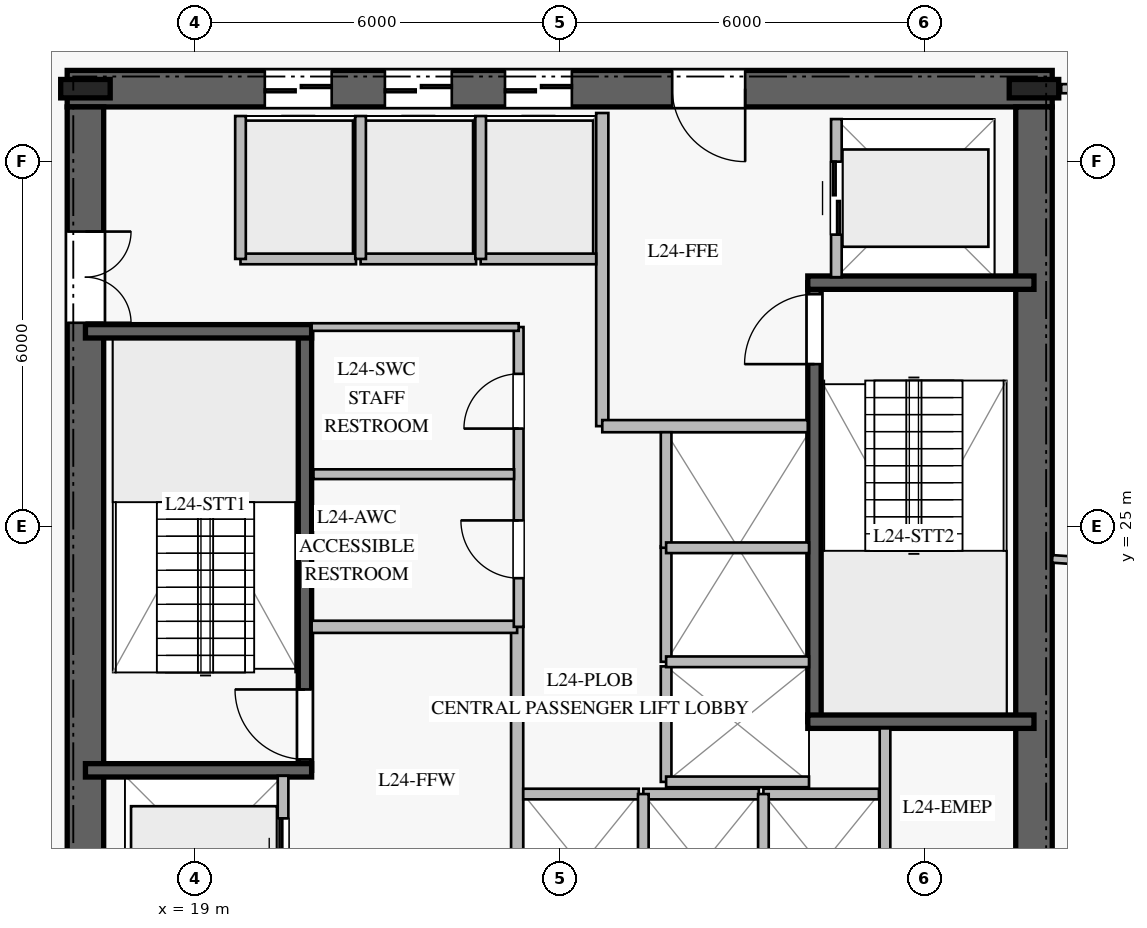
"""IFC4 building model, lengths in metres.
Left out: names, types, materials, properties, quantities, classifications, styles, units other than length and angle.
Written with IfcOpenShell. Run it as: python <this file> out.ifc"""

import sys

from ifc_helpers import new_model, si_unit, direction, frame, frame_2d, origin, origin_2d, place, context, subcontext, project, spatial, rectangle, i_section, extrude, element, fill, save


model = new_model("IFC4")
c1 = context("Model", 3, precision=1e-05, world=origin(), true_north=direction((0.0, 1.0)))
c2 = subcontext(c1, "Body", "Model", "MODEL_VIEW")
j1 = project(units=[si_unit("LENGTHUNIT", "METRE"), si_unit("PLANEANGLEUNIT", "RADIAN")], contexts=[c1])
p1 = place(None, origin())
s1 = spatial("IfcSite", under=j1, at=p1, CompositionType="ELEMENT")
p2 = place(p1, origin())
s2 = spatial("IfcBuilding", under=s1, at=p2, CompositionType="ELEMENT")
p3 = place(p2, frame((0.0, 0.0, 102.4)))
s3 = spatial("IfcBuildingStorey", under=s2, at=p3, CompositionType="ELEMENT", Elevation=102.4)
p4 = place(p3, frame((33.1, 32.2, 0.0), z_axis=(0.0, 0.0, 1.0), x_axis=(-1.0, 0.0, 0.0)))
e1 = element("IfcWall", 1, at=p4, inside=s3, PredefinedType="SHEAR", context=c2, shape_type="SweptSolid", body=[
    extrude(rectangle(XDim=16.2, YDim=0.6, at=frame_2d((8.1, 0.0))), origin(), (0.0, 0.0, 1.0), 3.76),
])
p5 = place(p4, frame((5.05, 0.0, 0.0)))
e2 = element("IfcOpeningElement", 2, at=p5, cuts=e1, PredefinedType="OPENING", context=c2, shape_type="SweptSolid", body=[
    extrude(rectangle(XDim=1.2, YDim=2.25, at=frame_2d((0.6, 1.125))), frame((0.0, 0.31, 0.0), z_axis=(0.0, -1.0, 0.0), x_axis=(1.0, 0.0, 0.0)), (0.0, 0.0, 1.0), 0.62),
])
p6 = place(p4, frame((11.85, 0.0, 0.0)))
e3 = element("IfcOpeningElement", 3, at=p6, cuts=e1, PredefinedType="OPENING", context=c2, shape_type="SweptSolid", body=[
    extrude(rectangle(XDim=1.1, YDim=2.2, at=frame_2d((0.55, 1.1))), frame((0.0, 0.31, 0.0), z_axis=(0.0, -1.0, 0.0), x_axis=(1.0, 0.0, 0.0)), (0.0, 0.0, 1.0), 0.62),
])
p7 = place(p4, frame((9.875, 0.0, 0.0)))
e4 = element("IfcOpeningElement", 4, at=p7, cuts=e1, PredefinedType="OPENING", context=c2, shape_type="SweptSolid", body=[
    extrude(rectangle(XDim=1.1, YDim=2.2, at=frame_2d((0.55, 1.1))), frame((0.0, 0.31, 0.0), z_axis=(0.0, -1.0, 0.0), x_axis=(1.0, 0.0, 0.0)), (0.0, 0.0, 1.0), 0.62),
])
p8 = place(p4, frame((7.9, 0.0, 0.0)))
e5 = element("IfcOpeningElement", 5, at=p8, cuts=e1, PredefinedType="OPENING", context=c2, shape_type="SweptSolid", body=[
    extrude(rectangle(XDim=1.1, YDim=2.2, at=frame_2d((0.55, 1.1))), frame((0.0, 0.31, 0.0), z_axis=(0.0, -1.0, 0.0), x_axis=(1.0, 0.0, 0.0)), (0.0, 0.0, 1.0), 0.62),
])
p9 = place(p3, frame((17.2, 31.9, 0.0), z_axis=(0.0, 0.0, 1.0), x_axis=(0.0, -1.0, 0.0)))
e6 = element("IfcWall", 6, at=p9, inside=s3, PredefinedType="SHEAR", context=c2, shape_type="SweptSolid", body=[
    extrude(rectangle(XDim=13.8, YDim=0.6, at=frame_2d((6.9, 0.0))), origin(), (0.0, 0.0, 1.0), 3.76),
])
p10 = place(p9, frame((2.05, 0.0, 0.0)))
e7 = element("IfcOpeningElement", 7, at=p10, cuts=e6, PredefinedType="OPENING", context=c2, shape_type="SweptSolid", body=[
    extrude(rectangle(XDim=1.5, YDim=2.2, at=frame_2d((0.75, 1.1))), frame((0.0, 0.31, 0.0), z_axis=(0.0, -1.0, 0.0), x_axis=(1.0, 0.0, 0.0)), (0.0, 0.0, 1.0), 0.62),
])
p11 = place(p3, frame((32.8, 18.1, 0.0), z_axis=(0.0, 0.0, 1.0), x_axis=(0.0, 1.0, 0.0)))
e8 = element("IfcWall", 8, at=p11, inside=s3, PredefinedType="SHEAR", context=c2, shape_type="SweptSolid", body=[
    extrude(rectangle(XDim=13.8, YDim=0.6, at=frame_2d((6.9, 0.0))), origin(), (0.0, 0.0, 1.0), 3.76),
])
for number, where, z_axis, x_axis in (
    (9, (32.8, 32.2, 0.0), (0.0, 0.0, 1.0), (1.0, 0.0, 0.0)),
    (10, (17.2, 32.2, 0.0), (0.0, 0.0, 1.0), (1.0, 0.0, 0.0)),
):
    element("IfcColumn", number, at=place(p3, frame(where, z_axis=z_axis, x_axis=x_axis)), inside=s3, PredefinedType="COLUMN", context=c2, shape_type="SweptSolid", body=[
        extrude(i_section(OverallWidth=0.303, OverallDepth=0.814, WebThickness=0.021, FlangeThickness=0.04, at=origin_2d()), origin(), (0.0, 0.0, 1.0), 4.0),
    ])
p12 = place(p3, frame((20.81, 20.99, 0.0), z_axis=(0.0, 0.0, 1.0), x_axis=(0.0, 1.0, 0.0)))
e11 = element("IfcWall", 11, at=p12, inside=s3, PredefinedType="SOLIDWALL", context=c2, shape_type="SweptSolid", body=[
    extrude(rectangle(XDim=7.22, YDim=0.22, at=frame_2d((3.61, 0.0))), origin(), (0.0, 0.0, 1.0), 3.76),
])
p13 = place(p12, frame((0.18, 0.0, 0.0)))
e12 = element("IfcOpeningElement", 12, at=p13, cuts=e11, PredefinedType="OPENING", context=c2, shape_type="SweptSolid", body=[
    extrude(rectangle(XDim=1.15, YDim=2.2, at=frame_2d((0.575, 1.1))), frame((0.0, 0.12, 0.0), z_axis=(0.0, -1.0, 0.0), x_axis=(1.0, 0.0, 0.0)), (0.0, 0.0, 1.0), 0.24),
])
for number, where, z_axis, x_axis in (
    (13, (17.2, 20.99, 0.0), (0.0, 0.0, 1.0), (1.0, 0.0, 0.0)),
    (14, (17.2, 28.21, 0.0), (0.0, 0.0, 1.0), (1.0, 0.0, 0.0)),
):
    element("IfcWall", number, at=place(p3, frame(where, z_axis=z_axis, x_axis=x_axis)), inside=s3, PredefinedType="SOLIDWALL", context=c2, shape_type="SweptSolid", body=[
        extrude(rectangle(XDim=3.72, YDim=0.22, at=frame_2d((1.86, 0.0))), origin(), (0.0, 0.0, 1.0), 3.76),
    ])
p14 = place(p3, frame((29.19, 21.79, 0.0), z_axis=(0.0, 0.0, 1.0), x_axis=(0.0, 1.0, 0.0)))
e15 = element("IfcWall", 15, at=p14, inside=s3, PredefinedType="SOLIDWALL", context=c2, shape_type="SweptSolid", body=[
    extrude(rectangle(XDim=7.22, YDim=0.22, at=frame_2d((3.61, 0.0))), origin(), (0.0, 0.0, 1.0), 3.76),
])
p15 = place(p14, frame((5.88, 0.0, 0.0)))
e16 = element("IfcOpeningElement", 16, at=p15, cuts=e15, PredefinedType="OPENING", context=c2, shape_type="SweptSolid", body=[
    extrude(rectangle(XDim=1.15, YDim=2.2, at=frame_2d((0.575, 1.1))), frame((0.0, 0.12, 0.0), z_axis=(0.0, -1.0, 0.0), x_axis=(1.0, 0.0, 0.0)), (0.0, 0.0, 1.0), 0.24),
])
for number, where, z_axis, x_axis in (
    (17, (29.08, 21.79, 0.0), (0.0, 0.0, 1.0), (1.0, 0.0, 0.0)),
    (18, (29.08, 29.01, 0.0), (0.0, 0.0, 1.0), (1.0, 0.0, 0.0)),
):
    element("IfcWall", number, at=place(p3, frame(where, z_axis=z_axis, x_axis=x_axis)), inside=s3, PredefinedType="SOLIDWALL", context=c2, shape_type="SweptSolid", body=[
        extrude(rectangle(XDim=3.72, YDim=0.22, at=frame_2d((1.86, 0.0))), origin(), (0.0, 0.0, 1.0), 3.76),
    ])
p16 = place(p3, frame((24.3, 18.2, 0.0), z_axis=(0.0, 0.0, 1.0), x_axis=(0.0, 1.0, 0.0)))
e19 = element("IfcWall", 19, at=p16, inside=s3, PredefinedType="PARTITIONING", context=c2, shape_type="SweptSolid", body=[
    extrude(rectangle(XDim=5.15, YDim=0.2, at=frame_2d((2.575, 0.0))), origin(), (0.0, 0.0, 1.0), 3.76),
])
p17 = place(p3, frame((20.92, 23.35, 0.0), z_axis=(0.0, 0.0, 1.0), x_axis=(1.0, 0.0, 0.0)))
e20 = element("IfcWall", 20, at=p17, inside=s3, PredefinedType="PARTITIONING", context=c2, shape_type="SweptSolid", body=[
    extrude(rectangle(XDim=3.38, YDim=0.2, at=frame_2d((1.69, 0.0))), origin(), (0.0, 0.0, 1.0), 3.76),
])
p18 = place(p3, frame((25.7, 26.65, 0.0), z_axis=(0.0, 0.0, 1.0), x_axis=(0.0, 1.0, 0.0)))
e21 = element("IfcWall", 21, at=p18, inside=s3, PredefinedType="PARTITIONING", context=c2, shape_type="SweptSolid", body=[
    extrude(rectangle(XDim=5.15, YDim=0.2, at=frame_2d((2.575, 0.0))), origin(), (0.0, 0.0, 1.0), 3.76),
])
p19 = place(p3, frame((25.7, 26.65, 0.0), z_axis=(0.0, 0.0, 1.0), x_axis=(1.0, 0.0, 0.0)))
e22 = element("IfcWall", 22, at=p19, inside=s3, PredefinedType="PARTITIONING", context=c2, shape_type="SweptSolid", body=[
    extrude(rectangle(XDim=3.38, YDim=0.2, at=frame_2d((1.69, 0.0))), origin(), (0.0, 0.0, 1.0), 3.76),
])
p20 = place(p3, frame((24.325, 23.35, 0.0), z_axis=(0.0, 0.0, 1.0), x_axis=(0.0, 1.0, 0.0)))
e23 = element("IfcWall", 23, at=p20, inside=s3, PredefinedType="PLUMBINGWALL", context=c2, shape_type="SweptSolid", body=[
    extrude(rectangle(XDim=4.93, YDim=0.16, at=frame_2d((2.465, 0.0))), origin(), (0.0, 0.0, 1.0), 3.76),
])
p21 = place(p20, frame((0.8, 0.0, 0.0)))
e24 = element("IfcOpeningElement", 24, at=p21, cuts=e23, PredefinedType="OPENING", context=c2, shape_type="SweptSolid", body=[
    extrude(rectangle(XDim=0.95, YDim=2.1, at=frame_2d((0.475, 1.05))), frame((0.0, 0.09, 0.0), z_axis=(0.0, -1.0, 0.0), x_axis=(1.0, 0.0, 0.0)), (0.0, 0.0, 1.0), 0.18),
])
p22 = place(p20, frame((3.26, 0.0, 0.0)))
e25 = element("IfcOpeningElement", 25, at=p22, cuts=e23, PredefinedType="OPENING", context=c2, shape_type="SweptSolid", body=[
    extrude(rectangle(XDim=0.9, YDim=2.1, at=frame_2d((0.45, 1.05))), frame((0.0, 0.09, 0.0), z_axis=(0.0, -1.0, 0.0), x_axis=(1.0, 0.0, 0.0)), (0.0, 0.0, 1.0), 0.18),
])
p23 = place(p3, frame((20.92, 28.28, 0.0), z_axis=(0.0, 0.0, 1.0), x_axis=(1.0, 0.0, 0.0)))
e26 = element("IfcWall", 26, at=p23, inside=s3, PredefinedType="PARTITIONING", context=c2, shape_type="SweptSolid", body=[
    extrude(rectangle(XDim=3.405, YDim=0.125, at=frame_2d((1.703, 0.0))), origin(), (0.0, 0.0, 1.0), 3.76),
])
p24 = place(p3, frame((20.95, 25.86, 0.0), z_axis=(0.0, 0.0, 1.0), x_axis=(1.0, 0.0, 0.0)))
e27 = element("IfcWall", 27, at=p24, inside=s3, PredefinedType="PLUMBINGWALL", context=c2, shape_type="SweptSolid", body=[
    extrude(rectangle(XDim=3.3, YDim=0.16, at=frame_2d((1.65, 0.0))), origin(), (0.0, 0.0, 1.0), 3.76),
])
p25 = place(p3, frame((30.35, 18.2, 0.0), z_axis=(0.0, 0.0, 1.0), x_axis=(0.0, 1.0, 0.0)))
e28 = element("IfcWall", 28, at=p25, inside=s3, PredefinedType="PARTITIONING", context=c2, shape_type="SweptSolid", body=[
    extrude(rectangle(XDim=3.48, YDim=0.175, at=frame_2d((1.74, 0.0))), origin(), (0.0, 0.0, 1.0), 3.76),
])
p26 = place(p3, frame((24.4, 20.6, 0.0), z_axis=(0.0, 0.0, 1.0), x_axis=(1.0, 0.0, 0.0)))
e29 = element("IfcWall", 29, at=p26, inside=s3, PredefinedType="PARTITIONING", context=c2, shape_type="SweptSolid", body=[
    extrude(rectangle(XDim=1.9, YDim=0.175, at=frame_2d((0.95, 0.0))), origin(), (0.0, 0.0, 1.0), 3.76),
])
p27 = place(p3, frame((26.375, 20.6, 0.0), z_axis=(0.0, 0.0, 1.0), x_axis=(1.0, 0.0, 0.0)))
e30 = element("IfcWall", 30, at=p27, inside=s3, PredefinedType="PARTITIONING", context=c2, shape_type="SweptSolid", body=[
    extrude(rectangle(XDim=1.9, YDim=0.175, at=frame_2d((0.95, 0.0))), origin(), (0.0, 0.0, 1.0), 3.76),
])
p28 = place(p3, frame((26.375, 18.25, 0.0), z_axis=(0.0, 0.0, 1.0), x_axis=(0.0, 1.0, 0.0)))
e31 = element("IfcWall", 31, at=p28, inside=s3, PredefinedType="PARTITIONING", context=c2, shape_type="SweptSolid", body=[
    extrude(rectangle(XDim=2.35, YDim=0.175, at=frame_2d((1.175, 0.0))), origin(), (0.0, 0.0, 1.0), 3.76),
])
p29 = place(p3, frame((28.35, 20.6, 0.0), z_axis=(0.0, 0.0, 1.0), x_axis=(1.0, 0.0, 0.0)))
e32 = element("IfcWall", 32, at=p29, inside=s3, PredefinedType="PARTITIONING", context=c2, shape_type="SweptSolid", body=[
    extrude(rectangle(XDim=1.9, YDim=0.175, at=frame_2d((0.95, 0.0))), origin(), (0.0, 0.0, 1.0), 3.76),
])
p30 = place(p3, frame((28.35, 18.25, 0.0), z_axis=(0.0, 0.0, 1.0), x_axis=(0.0, 1.0, 0.0)))
e33 = element("IfcWall", 33, at=p30, inside=s3, PredefinedType="PARTITIONING", context=c2, shape_type="SweptSolid", body=[
    extrude(rectangle(XDim=2.35, YDim=0.175, at=frame_2d((1.175, 0.0))), origin(), (0.0, 0.0, 1.0), 3.76),
])
p31 = place(p3, frame((19.75, 29.4, 0.0), z_axis=(0.0, 0.0, 1.0), x_axis=(1.0, 0.0, 0.0)))
e34 = element("IfcWall", 34, at=p31, inside=s3, PredefinedType="PARTITIONING", context=c2, shape_type="SweptSolid", body=[
    extrude(rectangle(XDim=1.9, YDim=0.175, at=frame_2d((0.95, 0.0))), origin(), (0.0, 0.0, 1.0), 3.76),
])
p32 = place(p3, frame((19.75, 29.4, 0.0), z_axis=(0.0, 0.0, 1.0), x_axis=(0.0, 1.0, 0.0)))
e35 = element("IfcWall", 35, at=p32, inside=s3, PredefinedType="PARTITIONING", context=c2, shape_type="SweptSolid", body=[
    extrude(rectangle(XDim=2.35, YDim=0.175, at=frame_2d((1.175, 0.0))), origin(), (0.0, 0.0, 1.0), 3.76),
])
p33 = place(p3, frame((21.725, 29.4, 0.0), z_axis=(0.0, 0.0, 1.0), x_axis=(1.0, 0.0, 0.0)))
e36 = element("IfcWall", 36, at=p33, inside=s3, PredefinedType="PARTITIONING", context=c2, shape_type="SweptSolid", body=[
    extrude(rectangle(XDim=1.9, YDim=0.175, at=frame_2d((0.95, 0.0))), origin(), (0.0, 0.0, 1.0), 3.76),
])
p34 = place(p3, frame((21.725, 29.4, 0.0), z_axis=(0.0, 0.0, 1.0), x_axis=(0.0, 1.0, 0.0)))
e37 = element("IfcWall", 37, at=p34, inside=s3, PredefinedType="PARTITIONING", context=c2, shape_type="SweptSolid", body=[
    extrude(rectangle(XDim=2.35, YDim=0.175, at=frame_2d((1.175, 0.0))), origin(), (0.0, 0.0, 1.0), 3.76),
])
p35 = place(p3, frame((23.7, 29.4, 0.0), z_axis=(0.0, 0.0, 1.0), x_axis=(1.0, 0.0, 0.0)))
e38 = element("IfcWall", 38, at=p35, inside=s3, PredefinedType="PARTITIONING", context=c2, shape_type="SweptSolid", body=[
    extrude(rectangle(XDim=1.9, YDim=0.175, at=frame_2d((0.95, 0.0))), origin(), (0.0, 0.0, 1.0), 3.76),
])
p36 = place(p3, frame((23.7, 29.4, 0.0), z_axis=(0.0, 0.0, 1.0), x_axis=(0.0, 1.0, 0.0)))
e39 = element("IfcWall", 39, at=p36, inside=s3, PredefinedType="PARTITIONING", context=c2, shape_type="SweptSolid", body=[
    extrude(rectangle(XDim=2.35, YDim=0.175, at=frame_2d((1.175, 0.0))), origin(), (0.0, 0.0, 1.0), 3.76),
])
p37 = place(p3, frame((26.75, 20.8, 0.0), z_axis=(0.0, 0.0, 1.0), x_axis=(0.0, 1.0, 0.0)))
e40 = element("IfcWall", 40, at=p37, inside=s3, PredefinedType="PARTITIONING", context=c2, shape_type="SweptSolid", body=[
    extrude(rectangle(XDim=1.9, YDim=0.175, at=frame_2d((0.95, 0.0))), origin(), (0.0, 0.0, 1.0), 3.76),
])
p38 = place(p3, frame((26.75, 20.8, 0.0), z_axis=(0.0, 0.0, 1.0), x_axis=(1.0, 0.0, 0.0)))
e41 = element("IfcWall", 41, at=p38, inside=s3, PredefinedType="PARTITIONING", context=c2, shape_type="SweptSolid", body=[
    extrude(rectangle(XDim=2.35, YDim=0.175, at=frame_2d((1.175, 0.0))), origin(), (0.0, 0.0, 1.0), 3.76),
])
p39 = place(p3, frame((26.75, 22.775, 0.0), z_axis=(0.0, 0.0, 1.0), x_axis=(0.0, 1.0, 0.0)))
e42 = element("IfcWall", 42, at=p39, inside=s3, PredefinedType="PARTITIONING", context=c2, shape_type="SweptSolid", body=[
    extrude(rectangle(XDim=1.9, YDim=0.175, at=frame_2d((0.95, 0.0))), origin(), (0.0, 0.0, 1.0), 3.76),
])
p40 = place(p3, frame((26.75, 22.775, 0.0), z_axis=(0.0, 0.0, 1.0), x_axis=(1.0, 0.0, 0.0)))
e43 = element("IfcWall", 43, at=p40, inside=s3, PredefinedType="PARTITIONING", context=c2, shape_type="SweptSolid", body=[
    extrude(rectangle(XDim=2.35, YDim=0.175, at=frame_2d((1.175, 0.0))), origin(), (0.0, 0.0, 1.0), 3.76),
])
p41 = place(p3, frame((26.75, 24.65, 0.0), z_axis=(0.0, 0.0, 1.0), x_axis=(0.0, 1.0, 0.0)))
e44 = element("IfcWall", 44, at=p41, inside=s3, PredefinedType="PARTITIONING", context=c2, shape_type="SweptSolid", body=[
    extrude(rectangle(XDim=1.9, YDim=0.175, at=frame_2d((0.95, 0.0))), origin(), (0.0, 0.0, 1.0), 3.76),
])
p42 = place(p3, frame((26.75, 24.65, 0.0), z_axis=(0.0, 0.0, 1.0), x_axis=(1.0, 0.0, 0.0)))
e45 = element("IfcWall", 45, at=p42, inside=s3, PredefinedType="PARTITIONING", context=c2, shape_type="SweptSolid", body=[
    extrude(rectangle(XDim=2.35, YDim=0.175, at=frame_2d((1.175, 0.0))), origin(), (0.0, 0.0, 1.0), 3.76),
])
p43 = place(p3, frame((20.45, 18.3, 0.0), z_axis=(0.0, 0.0, 1.0), x_axis=(0.0, 1.0, 0.0)))
e46 = element("IfcWall", 46, at=p43, inside=s3, PredefinedType="PARTITIONING", context=c2, shape_type="SweptSolid", body=[
    extrude(rectangle(XDim=2.6, YDim=0.175, at=frame_2d((1.3, 0.0))), origin(), (0.0, 0.0, 1.0), 3.76),
])
p44 = place(p43, frame((0.7, 0.0, 0.0)))
e47 = element("IfcOpeningElement", 47, at=p44, cuts=e46, PredefinedType="OPENING", context=c2, shape_type="SweptSolid", body=[
    extrude(rectangle(XDim=1.2, YDim=2.2, at=frame_2d((0.6, 1.1))), frame((0.0, 0.098, 0.0), z_axis=(0.0, -1.0, 0.0), x_axis=(1.0, 0.0, 0.0)), (0.0, 0.0, 1.0), 0.195),
])
p45 = place(p3, frame((29.55, 29.1, 0.0), z_axis=(0.0, 0.0, 1.0), x_axis=(0.0, 1.0, 0.0)))
e48 = element("IfcWall", 48, at=p45, inside=s3, PredefinedType="PARTITIONING", context=c2, shape_type="SweptSolid", body=[
    extrude(rectangle(XDim=2.6, YDim=0.175, at=frame_2d((1.3, 0.0))), origin(), (0.0, 0.0, 1.0), 3.76),
])
p46 = place(p45, frame((0.7, 0.0, 0.0)))
e49 = element("IfcOpeningElement", 49, at=p46, cuts=e48, PredefinedType="OPENING", context=c2, shape_type="SweptSolid", body=[
    extrude(rectangle(XDim=1.2, YDim=2.2, at=frame_2d((0.6, 1.1))), frame((0.0, 0.098, 0.0), z_axis=(0.0, -1.0, 0.0), x_axis=(1.0, 0.0, 0.0)), (0.0, 0.0, 1.0), 0.195),
])
p47 = place(p3, frame((41.2, 32.2, 0.0), z_axis=(0.0, 0.0, 1.0), x_axis=(-1.0, 0.0, 0.0)))
e50 = element("IfcWall", 50, at=p47, inside=s3, PredefinedType="PARTITIONING", context=c2, shape_type="SweptSolid", body=[
    extrude(rectangle(XDim=7.953, YDim=0.15, at=frame_2d((3.977, 0.0))), origin(), (0.0, 0.0, 1.0), 3.21),
])
p48 = place(p3, frame((33.1, 24.467, 0.0), z_axis=(0.0, 0.0, 1.0), x_axis=(0.997841404392, -0.06566986889, 0.0)))
e51 = element("IfcWall", 51, at=p48, inside=s3, PredefinedType="PARTITIONING", context=c2, shape_type="SweptSolid", body=[
    extrude(rectangle(XDim=11.755, YDim=0.125, at=frame_2d((5.878, 0.0))), origin(), (0.0, 0.0, 1.0), 3.05),
])
p49 = place(p13, origin())
e52 = element("IfcDoor", 52, at=p49, inside=s3, OperationType="SINGLE_SWING_RIGHT", PredefinedType="DOOR", context=c2, shape_type="SweptSolid", body=[
    extrude(rectangle(XDim=1.15, YDim=2.2, at=frame_2d((0.575, 1.1))), frame((0.0, 0.025, 0.0), z_axis=(0.0, -1.0, 0.0), x_axis=(1.0, 0.0, 0.0)), (0.0, 0.0, 1.0), 0.05),
])
fill(e12, e52)
p50 = place(p15, origin())
e53 = element("IfcDoor", 53, at=p50, inside=s3, OperationType="SINGLE_SWING_LEFT", PredefinedType="DOOR", context=c2, shape_type="SweptSolid", body=[
    extrude(rectangle(XDim=1.15, YDim=2.2, at=frame_2d((0.575, 1.1))), frame((0.0, 0.025, 0.0), z_axis=(0.0, -1.0, 0.0), x_axis=(1.0, 0.0, 0.0)), (0.0, 0.0, 1.0), 0.05),
])
fill(e16, e53)
p51 = place(p5, origin())
e54 = element("IfcDoor", 54, at=p51, inside=s3, OperationType="SINGLE_SWING_LEFT", PredefinedType="DOOR", context=c2, shape_type="SweptSolid", body=[
    extrude(rectangle(XDim=1.2, YDim=2.25, at=frame_2d((0.6, 1.125))), frame((0.0, 0.025, 0.0), z_axis=(0.0, -1.0, 0.0), x_axis=(1.0, 0.0, 0.0)), (0.0, 0.0, 1.0), 0.05),
])
fill(e2, e54)
p52 = place(p10, origin())
e55 = element("IfcDoor", 55, at=p52, inside=s3, OperationType="DOUBLE_DOOR_SINGLE_SWING", PredefinedType="DOOR", context=c2, shape_type="SweptSolid", body=[
    extrude(rectangle(XDim=1.5, YDim=2.2, at=frame_2d((0.75, 1.1))), frame((0.0, 0.025, 0.0), z_axis=(0.0, -1.0, 0.0), x_axis=(1.0, 0.0, 0.0)), (0.0, 0.0, 1.0), 0.05),
])
fill(e7, e55)
p53 = place(p21, origin())
e56 = element("IfcDoor", 56, at=p53, inside=s3, OperationType="SINGLE_SWING_RIGHT", PredefinedType="DOOR", context=c2, shape_type="SweptSolid", body=[
    extrude(rectangle(XDim=0.95, YDim=2.1, at=frame_2d((0.475, 1.05))), frame((0.0, 0.025, 0.0), z_axis=(0.0, -1.0, 0.0), x_axis=(1.0, 0.0, 0.0)), (0.0, 0.0, 1.0), 0.05),
])
fill(e24, e56)
p54 = place(p22, origin())
e57 = element("IfcDoor", 57, at=p54, inside=s3, OperationType="SINGLE_SWING_LEFT", PredefinedType="DOOR", context=c2, shape_type="SweptSolid", body=[
    extrude(rectangle(XDim=0.9, YDim=2.1, at=frame_2d((0.45, 1.05))), frame((0.0, 0.025, 0.0), z_axis=(0.0, -1.0, 0.0), x_axis=(1.0, 0.0, 0.0)), (0.0, 0.0, 1.0), 0.05),
])
fill(e25, e57)
p55 = place(p6, origin())
e58 = element("IfcDoor", 58, at=p55, inside=s3, OperationType="DOUBLE_DOOR_SLIDING", PredefinedType="DOOR", context=c2, shape_type="SweptSolid", body=[
    extrude(rectangle(XDim=1.1, YDim=2.2, at=frame_2d((0.55, 1.1))), frame((0.0, 0.025, 0.0), z_axis=(0.0, -1.0, 0.0), x_axis=(1.0, 0.0, 0.0)), (0.0, 0.0, 1.0), 0.05),
])
fill(e3, e58)
p56 = place(p7, origin())
e59 = element("IfcDoor", 59, at=p56, inside=s3, OperationType="DOUBLE_DOOR_SLIDING", PredefinedType="DOOR", context=c2, shape_type="SweptSolid", body=[
    extrude(rectangle(XDim=1.1, YDim=2.2, at=frame_2d((0.55, 1.1))), frame((0.0, 0.025, 0.0), z_axis=(0.0, -1.0, 0.0), x_axis=(1.0, 0.0, 0.0)), (0.0, 0.0, 1.0), 0.05),
])
fill(e4, e59)
p57 = place(p8, origin())
e60 = element("IfcDoor", 60, at=p57, inside=s3, OperationType="DOUBLE_DOOR_SLIDING", PredefinedType="DOOR", context=c2, shape_type="SweptSolid", body=[
    extrude(rectangle(XDim=1.1, YDim=2.2, at=frame_2d((0.55, 1.1))), frame((0.0, 0.025, 0.0), z_axis=(0.0, -1.0, 0.0), x_axis=(1.0, 0.0, 0.0)), (0.0, 0.0, 1.0), 0.05),
])
fill(e5, e60)
p58 = place(p44, origin())
e61 = element("IfcDoor", 61, at=p58, inside=s3, OperationType="DOUBLE_DOOR_SLIDING", PredefinedType="DOOR", context=c2, shape_type="SweptSolid", body=[
    extrude(rectangle(XDim=1.2, YDim=2.2, at=frame_2d((0.6, 1.1))), frame((0.0, 0.025, 0.0), z_axis=(0.0, -1.0, 0.0), x_axis=(1.0, 0.0, 0.0)), (0.0, 0.0, 1.0), 0.05),
])
fill(e47, e61)
p59 = place(p46, origin())
e62 = element("IfcDoor", 62, at=p59, inside=s3, OperationType="DOUBLE_DOOR_SLIDING", PredefinedType="DOOR", context=c2, shape_type="SweptSolid", body=[
    extrude(rectangle(XDim=1.2, YDim=2.2, at=frame_2d((0.6, 1.1))), frame((0.0, 0.025, 0.0), z_axis=(0.0, -1.0, 0.0), x_axis=(1.0, 0.0, 0.0)), (0.0, 0.0, 1.0), 0.05),
])
fill(e49, e62)
save(model, sys.argv[1])
